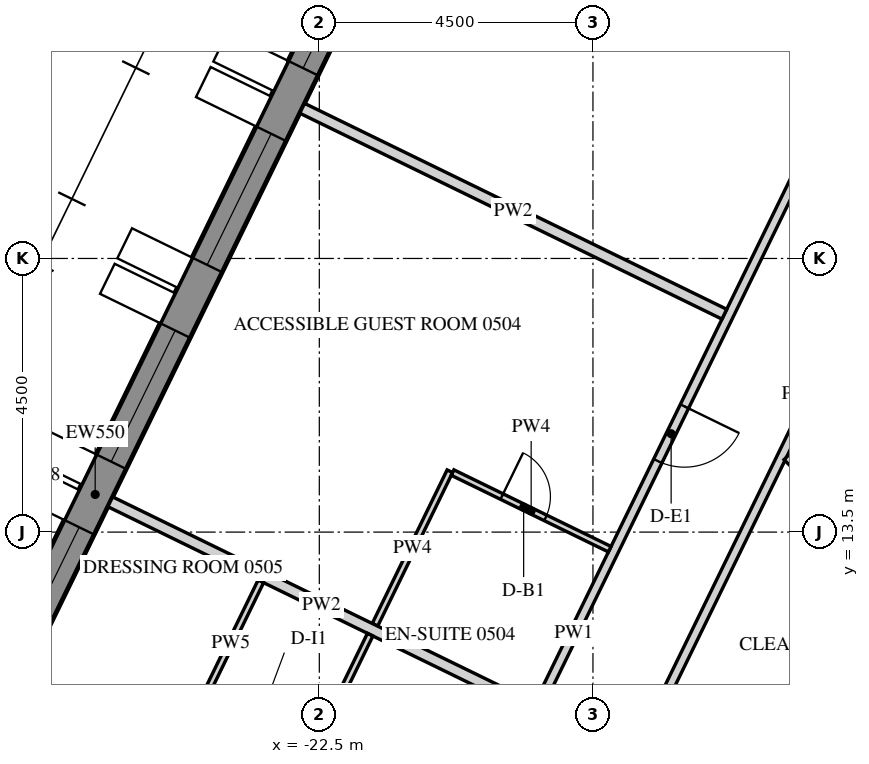
"""IFC4 building model, lengths in metres.
Left out: names, types, materials, properties, quantities, classifications, styles, units other than length and angle.
Written with IfcOpenShell. Run it as: python <this file> out.ifc"""

import sys

from ifc_helpers import new_model, si_unit, direction, frame, frame_2d, origin, place, context, subcontext, project, spatial, polyline, rectangle, outline, extrude, element, fill, save


model = new_model("IFC4")
c1 = context("Model", 3, precision=1e-05, world=origin(), true_north=direction((0.0, 1.0)))
c2 = subcontext(c1, "Body", "Model", "MODEL_VIEW")
j1 = project(units=[si_unit("LENGTHUNIT", "METRE"), si_unit("PLANEANGLEUNIT", "RADIAN")], contexts=[c1])
p1 = place(None, origin())
s1 = spatial("IfcSite", under=j1, at=p1, CompositionType="ELEMENT")
p2 = place(p1, origin())
s2 = spatial("IfcBuilding", under=s1, at=p2, CompositionType="ELEMENT")
p3 = place(p2, frame((0.0, 0.0, 80.4)))
s3 = spatial("IfcBuildingStorey", under=s2, at=p3, CompositionType="ELEMENT", Elevation=80.4)
p4 = place(p3, frame((-19.595, 27.633, -0.15), z_axis=(0.0, 0.0, 1.0), x_axis=(-0.438368285794, -0.898795441694, 0.0)))
e1 = element("IfcWall", 1, at=p4, inside=s3, PredefinedType="SOLIDWALL", context=c2, shape_type="SweptSolid", body=[
    extrude(outline(polyline([(-0.026, -0.275), (30.093, -0.275), (30.048, 0.275), (0.026, 0.275), (-0.026, -0.275)])), origin(), (0.0, 0.0, 1.0), 3.9),
])
p5 = place(p4, frame((1.236, 0.0, 1.05)))
e2 = element("IfcOpeningElement", 2, at=p5, cuts=e1, PredefinedType="OPENING", context=c2, shape_type="SweptSolid", body=[
    extrude(rectangle(XDim=2.4, YDim=2.4, at=frame_2d((1.2, 1.2))), frame((0.0, 0.285, 0.0), z_axis=(0.0, -1.0, 0.0), x_axis=(1.0, 0.0, 0.0)), (0.0, 0.0, 1.0), 0.57),
])
p6 = place(p4, frame((4.835, 0.0, 1.05)))
e3 = element("IfcOpeningElement", 3, at=p6, cuts=e1, PredefinedType="OPENING", context=c2, shape_type="SweptSolid", body=[
    extrude(rectangle(XDim=2.4, YDim=2.4, at=frame_2d((1.2, 1.2))), frame((0.0, 0.285, 0.0), z_axis=(0.0, -1.0, 0.0), x_axis=(1.0, 0.0, 0.0)), (0.0, 0.0, 1.0), 0.57),
])
p7 = place(p4, frame((8.436, 0.0, 1.05)))
e4 = element("IfcOpeningElement", 4, at=p7, cuts=e1, PredefinedType="OPENING", context=c2, shape_type="SweptSolid", body=[
    extrude(rectangle(XDim=2.4, YDim=2.4, at=frame_2d((1.2, 1.2))), frame((0.0, 0.285, 0.0), z_axis=(0.0, -1.0, 0.0), x_axis=(1.0, 0.0, 0.0)), (0.0, 0.0, 1.0), 0.57),
])
p8 = place(p4, frame((12.035, 0.0, 1.05)))
e5 = element("IfcOpeningElement", 5, at=p8, cuts=e1, PredefinedType="OPENING", context=c2, shape_type="SweptSolid", body=[
    extrude(rectangle(XDim=2.4, YDim=2.4, at=frame_2d((1.2, 1.2))), frame((0.0, 0.285, 0.0), z_axis=(0.0, -1.0, 0.0), x_axis=(1.0, 0.0, 0.0)), (0.0, 0.0, 1.0), 0.57),
])
p9 = place(p4, frame((15.635, 0.0, 1.05)))
e6 = element("IfcOpeningElement", 6, at=p9, cuts=e1, PredefinedType="OPENING", context=c2, shape_type="SweptSolid", body=[
    extrude(rectangle(XDim=2.4, YDim=2.4, at=frame_2d((1.2, 1.2))), frame((0.0, 0.285, 0.0), z_axis=(0.0, -1.0, 0.0), x_axis=(1.0, 0.0, 0.0)), (0.0, 0.0, 1.0), 0.57),
])
p10 = place(p4, frame((19.236, 0.0, 1.05)))
e7 = element("IfcOpeningElement", 7, at=p10, cuts=e1, PredefinedType="OPENING", context=c2, shape_type="SweptSolid", body=[
    extrude(rectangle(XDim=2.4, YDim=2.4, at=frame_2d((1.2, 1.2))), frame((0.0, 0.285, 0.0), z_axis=(0.0, -1.0, 0.0), x_axis=(1.0, 0.0, 0.0)), (0.0, 0.0, 1.0), 0.57),
])
p11 = place(p4, frame((22.835, 0.0, 1.05)))
e8 = element("IfcOpeningElement", 8, at=p11, cuts=e1, PredefinedType="OPENING", context=c2, shape_type="SweptSolid", body=[
    extrude(rectangle(XDim=2.4, YDim=2.4, at=frame_2d((1.2, 1.2))), frame((0.0, 0.285, 0.0), z_axis=(0.0, -1.0, 0.0), x_axis=(1.0, 0.0, 0.0)), (0.0, 0.0, 1.0), 0.57),
])
p12 = place(p4, frame((26.436, 0.0, 1.05)))
e9 = element("IfcOpeningElement", 9, at=p12, cuts=e1, PredefinedType="OPENING", context=c2, shape_type="SweptSolid", body=[
    extrude(rectangle(XDim=2.4, YDim=2.4, at=frame_2d((1.2, 1.2))), frame((0.0, 0.285, 0.0), z_axis=(0.0, -1.0, 0.0), x_axis=(1.0, 0.0, 0.0)), (0.0, 0.0, 1.0), 0.57),
])
p13 = place(p3, frame((-7.91, 13.7, -0.15), z_axis=(0.0, 0.0, 1.0), x_axis=(-0.499999880136, -0.866025472988, 0.0)))
e10 = element("IfcWall", 10, at=p13, inside=s3, PredefinedType="SHEAR", context=c2, shape_type="SweptSolid", body=[
    extrude(outline(polyline([(-0.173, -0.3), (15.993, -0.3), (15.646, 0.3), (0.173, 0.3), (-0.173, -0.3)])), origin(), (0.0, 0.0, 1.0), 3.9),
])
p14 = place(p13, frame((7.039, 0.0, 0.15)))
e11 = element("IfcOpeningElement", 11, at=p14, cuts=e10, PredefinedType="OPENING", context=c2, shape_type="SweptSolid", body=[
    extrude(rectangle(XDim=1.8, YDim=2.4, at=frame_2d((0.9, 1.2))), frame((0.0, 0.31, 0.0), z_axis=(0.0, -1.0, 0.0), x_axis=(1.0, 0.0, 0.0)), (0.0, 0.0, 1.0), 0.62),
])
p15 = place(p3, frame((-13.565, 21.575, 0.0), z_axis=(0.0, 0.0, 1.0), x_axis=(-0.438380787243, -0.898789344272, 0.0)))
e12 = element("IfcWall", 12, at=p15, inside=s3, PredefinedType="PARTITIONING", context=c2, shape_type="SweptSolid", body=[
    extrude(rectangle(XDim=21.668, YDim=0.15, at=frame_2d((10.834, 0.0))), origin(), (0.0, 0.0, 1.0), 2.988),
])
p16 = place(p15, frame((6.684, 0.0, 0.0)))
e13 = element("IfcOpeningElement", 13, at=p16, cuts=e12, PredefinedType="OPENING", context=c2, shape_type="SweptSolid", body=[
    extrude(rectangle(XDim=1.0, YDim=2.1, at=frame_2d((0.5, 1.05))), frame((0.0, 0.085, 0.0), z_axis=(0.0, -1.0, 0.0), x_axis=(1.0, 0.0, 0.0)), (0.0, 0.0, 1.0), 0.17),
])
p17 = place(p15, frame((17.651, 0.0, 0.0)))
e14 = element("IfcOpeningElement", 14, at=p17, cuts=e12, PredefinedType="OPENING", context=c2, shape_type="SweptSolid", body=[
    extrude(rectangle(XDim=1.0, YDim=2.1, at=frame_2d((0.5, 1.05))), frame((0.0, 0.085, 0.0), z_axis=(0.0, -1.0, 0.0), x_axis=(1.0, 0.0, 0.0)), (0.0, 0.0, 1.0), 0.17),
])
p18 = place(p3, frame((-16.751, 10.937, 0.0), z_axis=(0.0, 0.0, 1.0), x_axis=(0.438378523504, 0.898790448397, 0.0)))
e15 = element("IfcWall", 15, at=p18, inside=s3, PredefinedType="PARTITIONING", context=c2, shape_type="SweptSolid", body=[
    extrude(rectangle(XDim=9.917, YDim=0.15, at=frame_2d((4.958, 0.0))), origin(), (0.0, 0.0, 1.0), 2.988),
])
p19 = place(p3, frame((-22.782, 20.47, 0.0), z_axis=(0.0, 0.0, 1.0), x_axis=(0.898789402655, -0.438380667542, 0.0)))
e16 = element("IfcWall", 16, at=p19, inside=s3, PredefinedType="PARTITIONING", context=c2, shape_type="SweptSolid", body=[
    extrude(rectangle(XDim=7.725, YDim=0.18, at=frame_2d((3.862, 0.0))), origin(), (0.0, 0.0, 1.0), 2.988),
])
p20 = place(p3, frame((-21.585, 11.975, 0.0), z_axis=(0.0, 0.0, 1.0), x_axis=(0.438399667674, 0.898780135174, 0.0)))
e17 = element("IfcWall", 17, at=p20, inside=s3, PredefinedType="PARTITIONING", context=c2, shape_type="SweptSolid", body=[
    extrude(rectangle(XDim=2.81, YDim=0.1, at=frame_2d((1.405, 0.0))), origin(), (0.0, 0.0, 1.0), 2.988),
])
p21 = place(p3, frame((-20.308, 14.479, 0.0), z_axis=(0.0, 0.0, 1.0), x_axis=(0.898799457159, -0.438360052708, 0.0)))
e18 = element("IfcWall", 18, at=p21, inside=s3, PredefinedType="PARTITIONING", context=c2, shape_type="SweptSolid", body=[
    extrude(rectangle(XDim=2.875, YDim=0.1, at=frame_2d((1.438, 0.0))), origin(), (0.0, 0.0, 1.0), 2.988),
])
p22 = place(p21, frame((0.9, 0.0, 0.0)))
e19 = element("IfcOpeningElement", 19, at=p22, cuts=e18, PredefinedType="OPENING", context=c2, shape_type="SweptSolid", body=[
    extrude(rectangle(XDim=0.8, YDim=2.1, at=frame_2d((0.4, 1.05))), frame((0.0, 0.06, 0.0), z_axis=(0.0, -1.0, 0.0), x_axis=(1.0, 0.0, 0.0)), (0.0, 0.0, 1.0), 0.12),
])
p23 = place(p3, frame((-25.938, 13.999, 0.0), z_axis=(0.0, 0.0, 1.0), x_axis=(0.898789402655, -0.438380667542, 0.0)))
e20 = element("IfcWall", 20, at=p23, inside=s3, PredefinedType="PARTITIONING", context=c2, shape_type="SweptSolid", body=[
    extrude(rectangle(XDim=7.725, YDim=0.18, at=frame_2d((3.862, 0.0))), origin(), (0.0, 0.0, 1.0), 2.988),
])
for number, where, z_axis, x_axis in (
    (21, (-24.452, 10.659, 0.0), (0.0, 0.0, 1.0), (0.438, 0.899, 0.0)),
    (22, (-21.664, 11.813, 0.0), (0.0, 0.0, 1.0), (-0.438, -0.899, 0.0)),
):
    element("IfcWall", number, at=place(p3, frame(where, z_axis=z_axis, x_axis=x_axis)), inside=s3, PredefinedType="PARTITIONING", context=c2, shape_type="SweptSolid", body=[
        extrude(rectangle(XDim=2.26, YDim=0.1, at=frame_2d((1.13, 0.0))), origin(), (0.0, 0.0, 1.0), 2.988),
    ])
p24 = place(p3, frame((-14.815, 14.734, 0.0), z_axis=(0.0, 0.0, 1.0), x_axis=(0.709046184876, -0.705162043584, 0.0)))
e23 = element("IfcWall", 23, at=p24, inside=s3, PredefinedType="PARTITIONING", context=c2, shape_type="SweptSolid", body=[
    extrude(rectangle(XDim=6.411, YDim=0.12, at=frame_2d((3.206, 0.0))), origin(), (0.0, 0.0, 1.0), 2.988),
])
p25 = place(p6, frame((0.0, 0.205, 0.0)))
e24 = element("IfcWindow", 24, at=p25, inside=s3, PartitioningType="DOUBLE_PANEL_VERTICAL", PredefinedType="WINDOW", context=c2, shape_type="SweptSolid", body=[
    extrude(rectangle(XDim=2.4, YDim=2.4, at=frame_2d((1.2, 1.2))), frame((0.0, 0.03, 0.0), z_axis=(0.0, -1.0, 0.0), x_axis=(1.0, 0.0, 0.0)), (0.0, 0.0, 1.0), 0.06),
])
fill(e3, e24)
p26 = place(p7, frame((0.0, 0.205, 0.0)))
e25 = element("IfcWindow", 25, at=p26, inside=s3, PartitioningType="DOUBLE_PANEL_VERTICAL", PredefinedType="WINDOW", context=c2, shape_type="SweptSolid", body=[
    extrude(rectangle(XDim=2.4, YDim=2.4, at=frame_2d((1.2, 1.2))), frame((0.0, 0.03, 0.0), z_axis=(0.0, -1.0, 0.0), x_axis=(1.0, 0.0, 0.0)), (0.0, 0.0, 1.0), 0.06),
])
fill(e4, e25)
p27 = place(p8, frame((0.0, 0.205, 0.0)))
e26 = element("IfcWindow", 26, at=p27, inside=s3, PartitioningType="DOUBLE_PANEL_VERTICAL", PredefinedType="WINDOW", context=c2, shape_type="SweptSolid", body=[
    extrude(rectangle(XDim=2.4, YDim=2.4, at=frame_2d((1.2, 1.2))), frame((0.0, 0.03, 0.0), z_axis=(0.0, -1.0, 0.0), x_axis=(1.0, 0.0, 0.0)), (0.0, 0.0, 1.0), 0.06),
])
fill(e5, e26)
p28 = place(p9, frame((0.0, 0.205, 0.0)))
e27 = element("IfcWindow", 27, at=p28, inside=s3, PartitioningType="DOUBLE_PANEL_VERTICAL", PredefinedType="WINDOW", context=c2, shape_type="SweptSolid", body=[
    extrude(rectangle(XDim=2.4, YDim=2.4, at=frame_2d((1.2, 1.2))), frame((0.0, 0.03, 0.0), z_axis=(0.0, -1.0, 0.0), x_axis=(1.0, 0.0, 0.0)), (0.0, 0.0, 1.0), 0.06),
])
fill(e6, e27)
p29 = place(p16, origin())
e28 = element("IfcDoor", 28, at=p29, inside=s3, OperationType="SINGLE_SWING_LEFT", PredefinedType="DOOR", context=c2, shape_type="SweptSolid", body=[
    extrude(rectangle(XDim=1.0, YDim=2.1, at=frame_2d((0.5, 1.05))), frame((0.0, 0.025, 0.0), z_axis=(0.0, -1.0, 0.0), x_axis=(1.0, 0.0, 0.0)), (0.0, 0.0, 1.0), 0.05),
])
fill(e13, e28)
p30 = place(p22, origin())
e29 = element("IfcDoor", 29, at=p30, inside=s3, OperationType="SINGLE_SWING_RIGHT", PredefinedType="DOOR", context=c2, shape_type="SweptSolid", body=[
    extrude(rectangle(XDim=0.8, YDim=2.1, at=frame_2d((0.4, 1.05))), frame((0.0, 0.025, 0.0), z_axis=(0.0, -1.0, 0.0), x_axis=(1.0, 0.0, 0.0)), (0.0, 0.0, 1.0), 0.05),
])
fill(e19, e29)
save(model, sys.argv[1])
